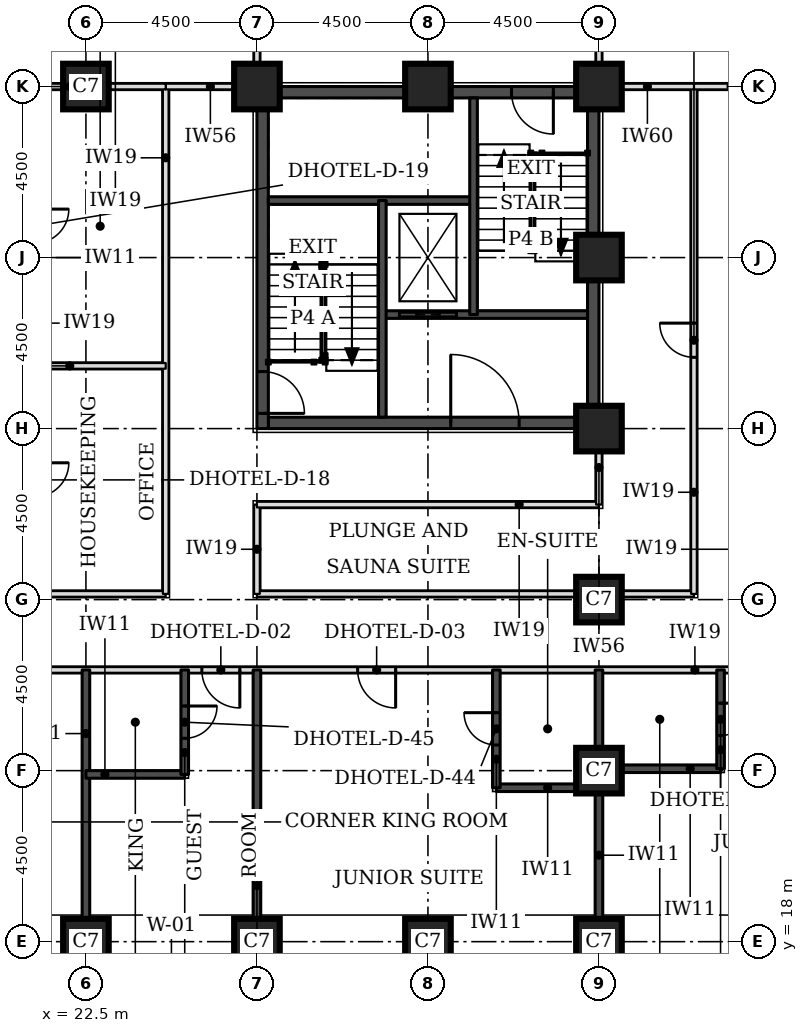
"""IFC4 building model, lengths in metres.
Left out: names, types, materials, properties, quantities, classifications, styles, units other than length and angle.
Written with IfcOpenShell. Run it as: python <this file> out.ifc"""

import sys

from ifc_helpers import new_model, si_unit, direction, frame, frame_2d, origin, origin_2d, place, context, subcontext, project, spatial, rectangle, extrude, element, fill, save


model = new_model("IFC4")
c1 = context("Model", 3, precision=1e-05, world=origin(), true_north=direction((0.0, 1.0)))
c2 = subcontext(c1, "Body", "Model", "MODEL_VIEW")
j1 = project(units=[si_unit("LENGTHUNIT", "METRE"), si_unit("PLANEANGLEUNIT", "RADIAN")], contexts=[c1])
p1 = place(None, origin())
s1 = spatial("IfcSite", under=j1, at=p1, CompositionType="ELEMENT")
p2 = place(p1, origin())
s2 = spatial("IfcBuilding", under=s1, at=p2, CompositionType="ELEMENT")
p3 = place(p2, frame((0.0, 0.0, 59.4)))
s3 = spatial("IfcBuildingStorey", under=s2, at=p3, CompositionType="ELEMENT", Elevation=59.4)
for number, where, z_axis, x_axis in (
    (1, (22.5, 18.0, 0.0), (0.0, 0.0, 1.0), (1.0, 0.0, 0.0)),
    (2, (27.0, 18.0, 0.0), (0.0, 0.0, 1.0), (1.0, 0.0, 0.0)),
    (3, (31.5, 18.0, 0.0), (0.0, 0.0, 1.0), (1.0, 0.0, 0.0)),
    (4, (36.0, 18.0, 0.0), (0.0, 0.0, 1.0), (1.0, 0.0, 0.0)),
    (5, (36.0, 22.5, 0.0), (0.0, 0.0, 1.0), (1.0, 0.0, 0.0)),
    (6, (36.0, 27.0, 0.0), (0.0, 0.0, 1.0), (1.0, 0.0, 0.0)),
    (7, (36.0, 31.5, 0.0), (0.0, 0.0, 1.0), (1.0, 0.0, 0.0)),
    (8, (36.0, 36.0, 0.0), (0.0, 0.0, 1.0), (1.0, 0.0, 0.0)),
    (9, (22.5, 40.5, 0.0), (0.0, 0.0, 1.0), (1.0, 0.0, 0.0)),
    (10, (27.0, 40.5, 0.0), (0.0, 0.0, 1.0), (1.0, 0.0, 0.0)),
    (11, (31.5, 40.5, 0.0), (0.0, 0.0, 1.0), (1.0, 0.0, 0.0)),
    (12, (36.0, 40.5, 0.0), (0.0, 0.0, 1.0), (1.0, 0.0, 0.0)),
):
    element("IfcColumn", number, at=place(p3, frame(where, z_axis=z_axis, x_axis=x_axis)), inside=s3, PredefinedType="COLUMN", context=c2, shape_type="SweptSolid", body=[
        extrude(rectangle(XDim=1.2, YDim=1.2, at=origin_2d()), origin(), (0.0, 0.0, 1.0), 3.3),
    ])
p4 = place(p3, frame((27.3, 31.65, 0.0), z_axis=(0.0, 0.0, 1.0), x_axis=(1.0, 0.0, 0.0)))
e13 = element("IfcWall", 13, at=p4, inside=s3, PredefinedType="SHEAR", context=c2, shape_type="SweptSolid", body=[
    extrude(rectangle(XDim=8.4, YDim=0.3, at=frame_2d((4.2, 0.0))), origin(), (0.0, 0.0, 1.0), 3.3),
])
p5 = place(p4, frame((4.8, 0.0, 0.0)))
e14 = element("IfcOpeningElement", 14, at=p5, cuts=e13, PredefinedType="OPENING", context=c2, shape_type="SweptSolid", body=[
    extrude(rectangle(XDim=1.8, YDim=2.1, at=frame_2d((0.9, 1.05))), frame((0.0, 0.16, 0.0), z_axis=(0.0, -1.0, 0.0), x_axis=(1.0, 0.0, 0.0)), (0.0, 0.0, 1.0), 0.32),
])
p6 = place(p3, frame((27.3, 40.35, 0.0), z_axis=(0.0, 0.0, 1.0), x_axis=(1.0, 0.0, 0.0)))
e15 = element("IfcWall", 15, at=p6, inside=s3, PredefinedType="SHEAR", context=c2, shape_type="SweptSolid", body=[
    extrude(rectangle(XDim=8.4, YDim=0.3, at=frame_2d((4.2, 0.0))), origin(), (0.0, 0.0, 1.0), 3.3),
])
p7 = place(p6, frame((6.4, 0.0, 0.0)))
e16 = element("IfcOpeningElement", 16, at=p7, cuts=e15, PredefinedType="OPENING", context=c2, shape_type="SweptSolid", body=[
    extrude(rectangle(XDim=1.1, YDim=2.1, at=frame_2d((0.55, 1.05))), frame((0.0, 0.16, 0.0), z_axis=(0.0, -1.0, 0.0), x_axis=(1.0, 0.0, 0.0)), (0.0, 0.0, 1.0), 0.32),
])
p8 = place(p3, frame((27.15, 31.5, 0.0), z_axis=(0.0, 0.0, 1.0), x_axis=(0.0, 1.0, 0.0)))
e17 = element("IfcWall", 17, at=p8, inside=s3, PredefinedType="SHEAR", context=c2, shape_type="SweptSolid", body=[
    extrude(rectangle(XDim=9.0, YDim=0.3, at=frame_2d((4.5, 0.0))), origin(), (0.0, 0.0, 1.0), 3.3),
])
p9 = place(p8, frame((0.4, 0.0, 0.0)))
e18 = element("IfcOpeningElement", 18, at=p9, cuts=e17, PredefinedType="OPENING", context=c2, shape_type="SweptSolid", body=[
    extrude(rectangle(XDim=1.1, YDim=2.1, at=frame_2d((0.55, 1.05))), frame((0.0, 0.16, 0.0), z_axis=(0.0, -1.0, 0.0), x_axis=(1.0, 0.0, 0.0)), (0.0, 0.0, 1.0), 0.32),
])
p10 = place(p3, frame((35.85, 31.5, 0.0), z_axis=(0.0, 0.0, 1.0), x_axis=(0.0, 1.0, 0.0)))
e19 = element("IfcWall", 19, at=p10, inside=s3, PredefinedType="SHEAR", context=c2, shape_type="SweptSolid", body=[
    extrude(rectangle(XDim=9.0, YDim=0.3, at=frame_2d((4.5, 0.0))), origin(), (0.0, 0.0, 1.0), 3.3),
])
p11 = place(p3, frame((19.15, 25.15, 0.0), z_axis=(0.0, 0.0, 1.0), x_axis=(1.0, 0.0, 0.0)))
e20 = element("IfcWall", 20, at=p11, inside=s3, PredefinedType="PARTITIONING", context=c2, shape_type="SweptSolid", body=[
    extrude(rectangle(XDim=32.35, YDim=0.15, at=frame_2d((16.175, 0.0))), origin(), (0.0, 0.0, 1.0), 3.08),
])
p12 = place(p11, frame((6.4, 0.0, 0.0)))
e21 = element("IfcOpeningElement", 21, at=p12, cuts=e20, PredefinedType="OPENING", context=c2, shape_type="SweptSolid", body=[
    extrude(rectangle(XDim=1.0, YDim=2.1, at=frame_2d((0.5, 1.05))), frame((0.0, 0.085, 0.0), z_axis=(0.0, -1.0, 0.0), x_axis=(1.0, 0.0, 0.0)), (0.0, 0.0, 1.0), 0.17),
])
p13 = place(p11, frame((10.5, 0.0, 0.0)))
e22 = element("IfcOpeningElement", 22, at=p13, cuts=e20, PredefinedType="OPENING", context=c2, shape_type="SweptSolid", body=[
    extrude(rectangle(XDim=1.0, YDim=2.1, at=frame_2d((0.5, 1.05))), frame((0.0, 0.085, 0.0), z_axis=(0.0, -1.0, 0.0), x_axis=(1.0, 0.0, 0.0)), (0.0, 0.0, 1.0), 0.17),
])
p14 = place(p11, frame((22.45, 0.0, 0.0)))
e23 = element("IfcOpeningElement", 23, at=p14, cuts=e20, PredefinedType="OPENING", context=c2, shape_type="SweptSolid", body=[
    extrude(rectangle(XDim=1.0, YDim=2.1, at=frame_2d((0.5, 1.05))), frame((0.0, 0.085, 0.0), z_axis=(0.0, -1.0, 0.0), x_axis=(1.0, 0.0, 0.0)), (0.0, 0.0, 1.0), 0.17),
])
p15 = place(p11, frame((26.55, 0.0, 0.0)))
e24 = element("IfcOpeningElement", 24, at=p15, cuts=e20, PredefinedType="OPENING", context=c2, shape_type="SweptSolid", body=[
    extrude(rectangle(XDim=1.0, YDim=2.1, at=frame_2d((0.5, 1.05))), frame((0.0, 0.085, 0.0), z_axis=(0.0, -1.0, 0.0), x_axis=(1.0, 0.0, 0.0)), (0.0, 0.0, 1.0), 0.17),
])
p16 = place(p11, frame((1.175, 0.0, 0.0)))
e25 = element("IfcOpeningElement", 25, at=p16, cuts=e20, PredefinedType="OPENING", context=c2, shape_type="SweptSolid", body=[
    extrude(rectangle(XDim=1.0, YDim=2.1, at=frame_2d((0.5, 1.05))), frame((0.0, 0.085, 0.0), z_axis=(0.0, -1.0, 0.0), x_axis=(1.0, 0.0, 0.0)), (0.0, 0.0, 1.0), 0.17),
])
p17 = place(p11, frame((30.85, 0.0, 0.0)))
e26 = element("IfcOpeningElement", 26, at=p17, cuts=e20, PredefinedType="OPENING", context=c2, shape_type="SweptSolid", body=[
    extrude(rectangle(XDim=1.0, YDim=2.1, at=frame_2d((0.5, 1.05))), frame((0.0, 0.085, 0.0), z_axis=(0.0, -1.0, 0.0), x_axis=(1.0, 0.0, 0.0)), (0.0, 0.0, 1.0), 0.17),
])
p18 = place(p3, frame((21.15, 27.15, 0.0), z_axis=(0.0, 0.0, 1.0), x_axis=(1.0, 0.0, 0.0)))
e27 = element("IfcWall", 27, at=p18, inside=s3, PredefinedType="PARTITIONING", context=c2, shape_type="SweptSolid", body=[
    extrude(rectangle(XDim=3.45, YDim=0.15, at=frame_2d((1.725, 0.0))), origin(), (0.0, 0.0, 1.0), 3.08),
])
p19 = place(p3, frame((24.6, 27.15, 0.0), z_axis=(0.0, 0.0, 1.0), x_axis=(0.0, 1.0, 0.0)))
e28 = element("IfcWall", 28, at=p19, inside=s3, PredefinedType="PARTITIONING", context=c2, shape_type="SweptSolid", body=[
    extrude(rectangle(XDim=13.35, YDim=0.15, at=frame_2d((6.675, 0.0))), origin(), (0.0, 0.0, 1.0), 3.08),
])
p20 = place(p3, frame((27.0, 27.15, 0.0), z_axis=(0.0, 0.0, 1.0), x_axis=(1.0, 0.0, 0.0)))
e29 = element("IfcWall", 29, at=p20, inside=s3, PredefinedType="PARTITIONING", context=c2, shape_type="SweptSolid", body=[
    extrude(rectangle(XDim=11.5, YDim=0.15, at=frame_2d((5.75, 0.0))), origin(), (0.0, 0.0, 1.0), 3.08),
])
p21 = place(p3, frame((27.0, 27.15, 0.0), z_axis=(0.0, 0.0, 1.0), x_axis=(0.0, 1.0, 0.0)))
e30 = element("IfcWall", 30, at=p21, inside=s3, PredefinedType="PARTITIONING", context=c2, shape_type="SweptSolid", body=[
    extrude(rectangle(XDim=2.35, YDim=0.15, at=frame_2d((1.175, 0.0))), origin(), (0.0, 0.0, 1.0), 3.08),
])
p22 = place(p3, frame((38.5, 27.15, 0.0), z_axis=(0.0, 0.0, 1.0), x_axis=(0.0, 1.0, 0.0)))
e31 = element("IfcWall", 31, at=p22, inside=s3, PredefinedType="PARTITIONING", context=c2, shape_type="SweptSolid", body=[
    extrude(rectangle(XDim=13.35, YDim=0.15, at=frame_2d((6.675, 0.0))), origin(), (0.0, 0.0, 1.0), 3.08),
])
p23 = place(p22, frame((6.225, 0.0, 0.0)))
e32 = element("IfcOpeningElement", 32, at=p23, cuts=e31, PredefinedType="OPENING", context=c2, shape_type="SweptSolid", body=[
    extrude(rectangle(XDim=0.9, YDim=2.1, at=frame_2d((0.45, 1.05))), frame((0.0, 0.085, 0.0), z_axis=(0.0, -1.0, 0.0), x_axis=(1.0, 0.0, 0.0)), (0.0, 0.0, 1.0), 0.17),
])
p24 = place(p3, frame((27.0, 29.5, 0.0), z_axis=(0.0, 0.0, 1.0), x_axis=(1.0, 0.0, 0.0)))
e33 = element("IfcWall", 33, at=p24, inside=s3, PredefinedType="PARTITIONING", context=c2, shape_type="SweptSolid", body=[
    extrude(rectangle(XDim=9.0, YDim=0.15, at=frame_2d((4.5, 0.0))), origin(), (0.0, 0.0, 1.0), 3.08),
])
p25 = place(p3, frame((36.0, 29.5, 0.0), z_axis=(0.0, 0.0, 1.0), x_axis=(0.0, 1.0, 0.0)))
e34 = element("IfcWall", 34, at=p25, inside=s3, PredefinedType="PARTITIONING", context=c2, shape_type="SweptSolid", body=[
    extrude(rectangle(XDim=1.95, YDim=0.15, at=frame_2d((0.975, 0.0))), origin(), (0.0, 0.0, 1.0), 2.33),
])
p26 = place(p3, frame((24.6, 40.5, 0.0), z_axis=(0.0, 0.0, 1.0), x_axis=(1.0, 0.0, 0.0)))
e35 = element("IfcWall", 35, at=p26, inside=s3, PredefinedType="PARTITIONING", context=c2, shape_type="SweptSolid", body=[
    extrude(rectangle(XDim=2.35, YDim=0.15, at=frame_2d((1.175, 0.0))), origin(), (0.0, 0.0, 1.0), 2.33),
])
p27 = place(p3, frame((38.5, 40.5, 0.0), z_axis=(0.0, 0.0, 1.0), x_axis=(1.0, 0.0, 0.0)))
e36 = element("IfcWall", 36, at=p27, inside=s3, PredefinedType="PARTITIONING", context=c2, shape_type="SweptSolid", body=[
    extrude(rectangle(XDim=1.95, YDim=0.15, at=frame_2d((0.975, 0.0))), origin(), (0.0, 0.0, 1.0), 2.33),
])
p28 = place(p3, frame((27.0, 40.55, 0.0), z_axis=(0.0, 0.0, 1.0), x_axis=(0.0, 1.0, 0.0)))
e37 = element("IfcWall", 37, at=p28, inside=s3, PredefinedType="PARTITIONING", context=c2, shape_type="SweptSolid", body=[
    extrude(rectangle(XDim=2.45, YDim=0.15, at=frame_2d((1.225, 0.0))), origin(), (0.0, 0.0, 1.0), 3.08),
])
p29 = place(p3, frame((36.0, 40.55, 0.0), z_axis=(0.0, 0.0, 1.0), x_axis=(0.0, 1.0, 0.0)))
e38 = element("IfcWall", 38, at=p29, inside=s3, PredefinedType="PARTITIONING", context=c2, shape_type="SweptSolid", body=[
    extrude(rectangle(XDim=4.4, YDim=0.15, at=frame_2d((2.2, 0.0))), origin(), (0.0, 0.0, 1.0), 2.33),
])
for number, where, z_axis, x_axis in (
    (39, (22.5, 18.6, 0.0), (0.0, 0.0, 1.0), (0.0, 1.0, 0.0)),
    (40, (27.0, 18.6, 0.0), (0.0, 0.0, 1.0), (0.0, 1.0, 0.0)),
    (41, (36.0, 18.6, 0.0), (0.0, 0.0, 1.0), (0.0, 1.0, 0.0)),
):
    element("IfcWall", number, at=place(p3, frame(where, z_axis=z_axis, x_axis=x_axis)), inside=s3, PredefinedType="SOLIDWALL", context=c2, shape_type="SweptSolid", body=[
        extrude(rectangle(XDim=6.55, YDim=0.2, at=frame_2d((3.275, 0.0))), origin(), (0.0, 0.0, 1.0), 3.08),
    ])
p30 = place(p3, frame((33.3, 22.05, 0.0), z_axis=(0.0, 0.0, 1.0), x_axis=(1.0, 0.0, 0.0)))
e42 = element("IfcWall", 42, at=p30, inside=s3, PredefinedType="SOLIDWALL", context=c2, shape_type="SweptSolid", body=[
    extrude(rectangle(XDim=2.7, YDim=0.2, at=frame_2d((1.35, 0.0))), origin(), (0.0, 0.0, 1.0), 3.08),
])
p31 = place(p3, frame((33.3, 22.05, 0.0), z_axis=(0.0, 0.0, 1.0), x_axis=(0.0, 1.0, 0.0)))
e43 = element("IfcWall", 43, at=p31, inside=s3, PredefinedType="SOLIDWALL", context=c2, shape_type="SweptSolid", body=[
    extrude(rectangle(XDim=3.1, YDim=0.2, at=frame_2d((1.55, 0.0))), origin(), (0.0, 0.0, 1.0), 3.08),
])
p32 = place(p31, frame((1.125, 0.0, 0.0)))
e44 = element("IfcOpeningElement", 44, at=p32, cuts=e43, PredefinedType="OPENING", context=c2, shape_type="SweptSolid", body=[
    extrude(rectangle(XDim=0.85, YDim=2.1, at=frame_2d((0.425, 1.05))), frame((0.0, 0.11, 0.0), z_axis=(0.0, -1.0, 0.0), x_axis=(1.0, 0.0, 0.0)), (0.0, 0.0, 1.0), 0.22),
])
p33 = place(p3, frame((22.5, 22.4, 0.0), z_axis=(0.0, 0.0, 1.0), x_axis=(1.0, 0.0, 0.0)))
e45 = element("IfcWall", 45, at=p33, inside=s3, PredefinedType="SOLIDWALL", context=c2, shape_type="SweptSolid", body=[
    extrude(rectangle(XDim=2.6, YDim=0.2, at=frame_2d((1.3, 0.0))), origin(), (0.0, 0.0, 1.0), 3.08),
])
p34 = place(p3, frame((25.1, 22.4, 0.0), z_axis=(0.0, 0.0, 1.0), x_axis=(0.0, 1.0, 0.0)))
e46 = element("IfcWall", 46, at=p34, inside=s3, PredefinedType="SOLIDWALL", context=c2, shape_type="SweptSolid", body=[
    extrude(rectangle(XDim=2.75, YDim=0.2, at=frame_2d((1.375, 0.0))), origin(), (0.0, 0.0, 1.0), 3.08),
])
p35 = place(p34, frame((0.95, 0.0, 0.0)))
e47 = element("IfcOpeningElement", 47, at=p35, cuts=e46, PredefinedType="OPENING", context=c2, shape_type="SweptSolid", body=[
    extrude(rectangle(XDim=0.85, YDim=2.1, at=frame_2d((0.425, 1.05))), frame((0.0, 0.11, 0.0), z_axis=(0.0, -1.0, 0.0), x_axis=(1.0, 0.0, 0.0)), (0.0, 0.0, 1.0), 0.22),
])
p36 = place(p3, frame((36.0, 22.55, 0.0), z_axis=(0.0, 0.0, 1.0), x_axis=(1.0, 0.0, 0.0)))
e48 = element("IfcWall", 48, at=p36, inside=s3, PredefinedType="SOLIDWALL", context=c2, shape_type="SweptSolid", body=[
    extrude(rectangle(XDim=3.2, YDim=0.2, at=frame_2d((1.6, 0.0))), origin(), (0.0, 0.0, 1.0), 3.08),
])
p37 = place(p3, frame((39.2, 22.55, 0.0), z_axis=(0.0, 0.0, 1.0), x_axis=(0.0, 1.0, 0.0)))
e49 = element("IfcWall", 49, at=p37, inside=s3, PredefinedType="SOLIDWALL", context=c2, shape_type="SweptSolid", body=[
    extrude(rectangle(XDim=2.6, YDim=0.2, at=frame_2d((1.3, 0.0))), origin(), (0.0, 0.0, 1.0), 3.08),
])
p38 = place(p37, frame((0.875, 0.0, 0.0)))
e50 = element("IfcOpeningElement", 50, at=p38, cuts=e49, PredefinedType="OPENING", context=c2, shape_type="SweptSolid", body=[
    extrude(rectangle(XDim=0.85, YDim=2.1, at=frame_2d((0.425, 1.05))), frame((0.0, 0.11, 0.0), z_axis=(0.0, -1.0, 0.0), x_axis=(1.0, 0.0, 0.0)), (0.0, 0.0, 1.0), 0.22),
])
p39 = place(p3, frame((21.15, 33.15, 0.0), z_axis=(0.0, 0.0, 1.0), x_axis=(1.0, 0.0, 0.0)))
e51 = element("IfcWall", 51, at=p39, inside=s3, PredefinedType="PARTITIONING", context=c2, shape_type="SweptSolid", body=[
    extrude(rectangle(XDim=3.45, YDim=0.15, at=frame_2d((1.725, 0.0))), origin(), (0.0, 0.0, 1.0), 3.08),
])
p40 = place(p3, frame((21.15, 40.5, 0.0), z_axis=(0.0, 0.0, 1.0), x_axis=(1.0, 0.0, 0.0)))
e52 = element("IfcWall", 52, at=p40, inside=s3, PredefinedType="PARTITIONING", context=c2, shape_type="SweptSolid", body=[
    extrude(rectangle(XDim=3.45, YDim=0.15, at=frame_2d((1.725, 0.0))), origin(), (0.0, 0.0, 1.0), 2.33),
])
p41 = place(p3, frame((36.05, 40.5, 0.0), z_axis=(0.0, 0.0, 1.0), x_axis=(1.0, 0.0, 0.0)))
e53 = element("IfcWall", 53, at=p41, inside=s3, PredefinedType="PARTITIONING", context=c2, shape_type="SweptSolid", body=[
    extrude(rectangle(XDim=2.45, YDim=0.15, at=frame_2d((1.225, 0.0))), origin(), (0.0, 0.0, 1.0), 2.33),
])
p42 = place(p3, frame((30.3, 34.5, 0.0), z_axis=(0.0, 0.0, 1.0), x_axis=(1.0, 0.0, 0.0)))
e54 = element("IfcWall", 54, at=p42, inside=s3, PredefinedType="SOLIDWALL", context=c2, shape_type="SweptSolid", body=[
    extrude(rectangle(XDim=5.4, YDim=0.2, at=frame_2d((2.7, 0.0))), origin(), (0.0, 0.0, 1.0), 3.08),
])
p43 = place(p42, frame((0.45, 0.0, 0.0)))
e55 = element("IfcOpeningElement", 55, at=p43, cuts=e54, PredefinedType="OPENING", context=c2, shape_type="SweptSolid", body=[
    extrude(rectangle(XDim=1.5, YDim=2.1, at=frame_2d((0.75, 1.05))), frame((0.0, 0.11, 0.0), z_axis=(0.0, -1.0, 0.0), x_axis=(1.0, 0.0, 0.0)), (0.0, 0.0, 1.0), 0.22),
])
p44 = place(p3, frame((27.3, 37.5, 0.0), z_axis=(0.0, 0.0, 1.0), x_axis=(1.0, 0.0, 0.0)))
e56 = element("IfcWall", 56, at=p44, inside=s3, PredefinedType="SOLIDWALL", context=c2, shape_type="SweptSolid", body=[
    extrude(rectangle(XDim=5.4, YDim=0.2, at=frame_2d((2.7, 0.0))), origin(), (0.0, 0.0, 1.0), 3.08),
])
for number, where, z_axis, x_axis in (
    (57, (30.3, 31.8, 0.0), (0.0, 0.0, 1.0), (0.0, 1.0, 0.0)),
    (58, (32.7, 34.5, 0.0), (0.0, 0.0, 1.0), (0.0, 1.0, 0.0)),
):
    element("IfcWall", number, at=place(p3, frame(where, z_axis=z_axis, x_axis=x_axis)), inside=s3, PredefinedType="SOLIDWALL", context=c2, shape_type="SweptSolid", body=[
        extrude(rectangle(XDim=5.7, YDim=0.2, at=frame_2d((2.85, 0.0))), origin(), (0.0, 0.0, 1.0), 3.08),
    ])
p45 = place(p12, frame((1.0, 0.0, 0.0), z_axis=(0.0, 0.0, 1.0), x_axis=(-1.0, 0.0, 0.0)))
e59 = element("IfcDoor", 59, at=p45, inside=s3, OperationType="SINGLE_SWING_LEFT", PredefinedType="DOOR", context=c2, shape_type="SweptSolid", body=[
    extrude(rectangle(XDim=1.0, YDim=2.1, at=frame_2d((0.5, 1.05))), frame((0.0, 0.025, 0.0), z_axis=(0.0, -1.0, 0.0), x_axis=(1.0, 0.0, 0.0)), (0.0, 0.0, 1.0), 0.05),
])
fill(e21, e59)
p46 = place(p35, frame((0.85, 0.0, 0.0), z_axis=(0.0, 0.0, 1.0), x_axis=(-1.0, 0.0, 0.0)))
e60 = element("IfcDoor", 60, at=p46, inside=s3, OperationType="SINGLE_SWING_LEFT", PredefinedType="DOOR", context=c2, shape_type="SweptSolid", body=[
    extrude(rectangle(XDim=0.85, YDim=2.1, at=frame_2d((0.425, 1.05))), frame((0.0, 0.025, 0.0), z_axis=(0.0, -1.0, 0.0), x_axis=(1.0, 0.0, 0.0)), (0.0, 0.0, 1.0), 0.05),
])
fill(e47, e60)
p47 = place(p13, frame((1.0, 0.0, 0.0), z_axis=(0.0, 0.0, 1.0), x_axis=(-1.0, 0.0, 0.0)))
e61 = element("IfcDoor", 61, at=p47, inside=s3, OperationType="SINGLE_SWING_LEFT", PredefinedType="DOOR", context=c2, shape_type="SweptSolid", body=[
    extrude(rectangle(XDim=1.0, YDim=2.1, at=frame_2d((0.5, 1.05))), frame((0.0, 0.025, 0.0), z_axis=(0.0, -1.0, 0.0), x_axis=(1.0, 0.0, 0.0)), (0.0, 0.0, 1.0), 0.05),
])
fill(e22, e61)
p48 = place(p32, origin())
e62 = element("IfcDoor", 62, at=p48, inside=s3, OperationType="SINGLE_SWING_RIGHT", PredefinedType="DOOR", context=c2, shape_type="SweptSolid", body=[
    extrude(rectangle(XDim=0.85, YDim=2.1, at=frame_2d((0.425, 1.05))), frame((0.0, 0.025, 0.0), z_axis=(0.0, -1.0, 0.0), x_axis=(1.0, 0.0, 0.0)), (0.0, 0.0, 1.0), 0.05),
])
fill(e44, e62)
p49 = place(p38, frame((0.85, 0.0, 0.0), z_axis=(0.0, 0.0, 1.0), x_axis=(-1.0, 0.0, 0.0)))
e63 = element("IfcDoor", 63, at=p49, inside=s3, OperationType="SINGLE_SWING_LEFT", PredefinedType="DOOR", context=c2, shape_type="SweptSolid", body=[
    extrude(rectangle(XDim=0.85, YDim=2.1, at=frame_2d((0.425, 1.05))), frame((0.0, 0.025, 0.0), z_axis=(0.0, -1.0, 0.0), x_axis=(1.0, 0.0, 0.0)), (0.0, 0.0, 1.0), 0.05),
])
fill(e50, e63)
p50 = place(p23, origin())
e64 = element("IfcDoor", 64, at=p50, inside=s3, OperationType="SINGLE_SWING_RIGHT", PredefinedType="DOOR", context=c2, shape_type="SweptSolid", body=[
    extrude(rectangle(XDim=0.9, YDim=2.1, at=frame_2d((0.45, 1.05))), frame((0.0, 0.025, 0.0), z_axis=(0.0, -1.0, 0.0), x_axis=(1.0, 0.0, 0.0)), (0.0, 0.0, 1.0), 0.05),
])
fill(e32, e64)
p51 = place(p9, frame((1.1, 0.0, 0.0), z_axis=(0.0, 0.0, 1.0), x_axis=(-1.0, 0.0, 0.0)))
e65 = element("IfcDoor", 65, at=p51, inside=s3, OperationType="SINGLE_SWING_RIGHT", PredefinedType="DOOR", context=c2, shape_type="SweptSolid", body=[
    extrude(rectangle(XDim=1.1, YDim=2.1, at=frame_2d((0.55, 1.05))), frame((0.0, 0.025, 0.0), z_axis=(0.0, -1.0, 0.0), x_axis=(1.0, 0.0, 0.0)), (0.0, 0.0, 1.0), 0.05),
])
fill(e18, e65)
p52 = place(p7, frame((1.1, 0.0, 0.0), z_axis=(0.0, 0.0, 1.0), x_axis=(-1.0, 0.0, 0.0)))
e66 = element("IfcDoor", 66, at=p52, inside=s3, OperationType="SINGLE_SWING_LEFT", PredefinedType="DOOR", context=c2, shape_type="SweptSolid", body=[
    extrude(rectangle(XDim=1.1, YDim=2.1, at=frame_2d((0.55, 1.05))), frame((0.0, 0.025, 0.0), z_axis=(0.0, -1.0, 0.0), x_axis=(1.0, 0.0, 0.0)), (0.0, 0.0, 1.0), 0.05),
])
fill(e16, e66)
p53 = place(p43, origin())
e67 = element("IfcDoor", 67, at=p53, inside=s3, OperationType="DOUBLE_DOOR_SLIDING", PredefinedType="DOOR", context=c2, shape_type="SweptSolid", body=[
    extrude(rectangle(XDim=1.5, YDim=2.1, at=frame_2d((0.75, 1.05))), frame((0.0, 0.025, 0.0), z_axis=(0.0, -1.0, 0.0), x_axis=(1.0, 0.0, 0.0)), (0.0, 0.0, 1.0), 0.05),
])
fill(e55, e67)
p54 = place(p5, origin())
e68 = element("IfcDoor", 68, at=p54, inside=s3, OperationType="SINGLE_SWING_LEFT", PredefinedType="DOOR", context=c2, shape_type="SweptSolid", body=[
    extrude(rectangle(XDim=1.8, YDim=2.1, at=frame_2d((0.9, 1.05))), frame((0.0, 0.025, 0.0), z_axis=(0.0, -1.0, 0.0), x_axis=(1.0, 0.0, 0.0)), (0.0, 0.0, 1.0), 0.05),
])
fill(e14, e68)
save(model, sys.argv[1])
